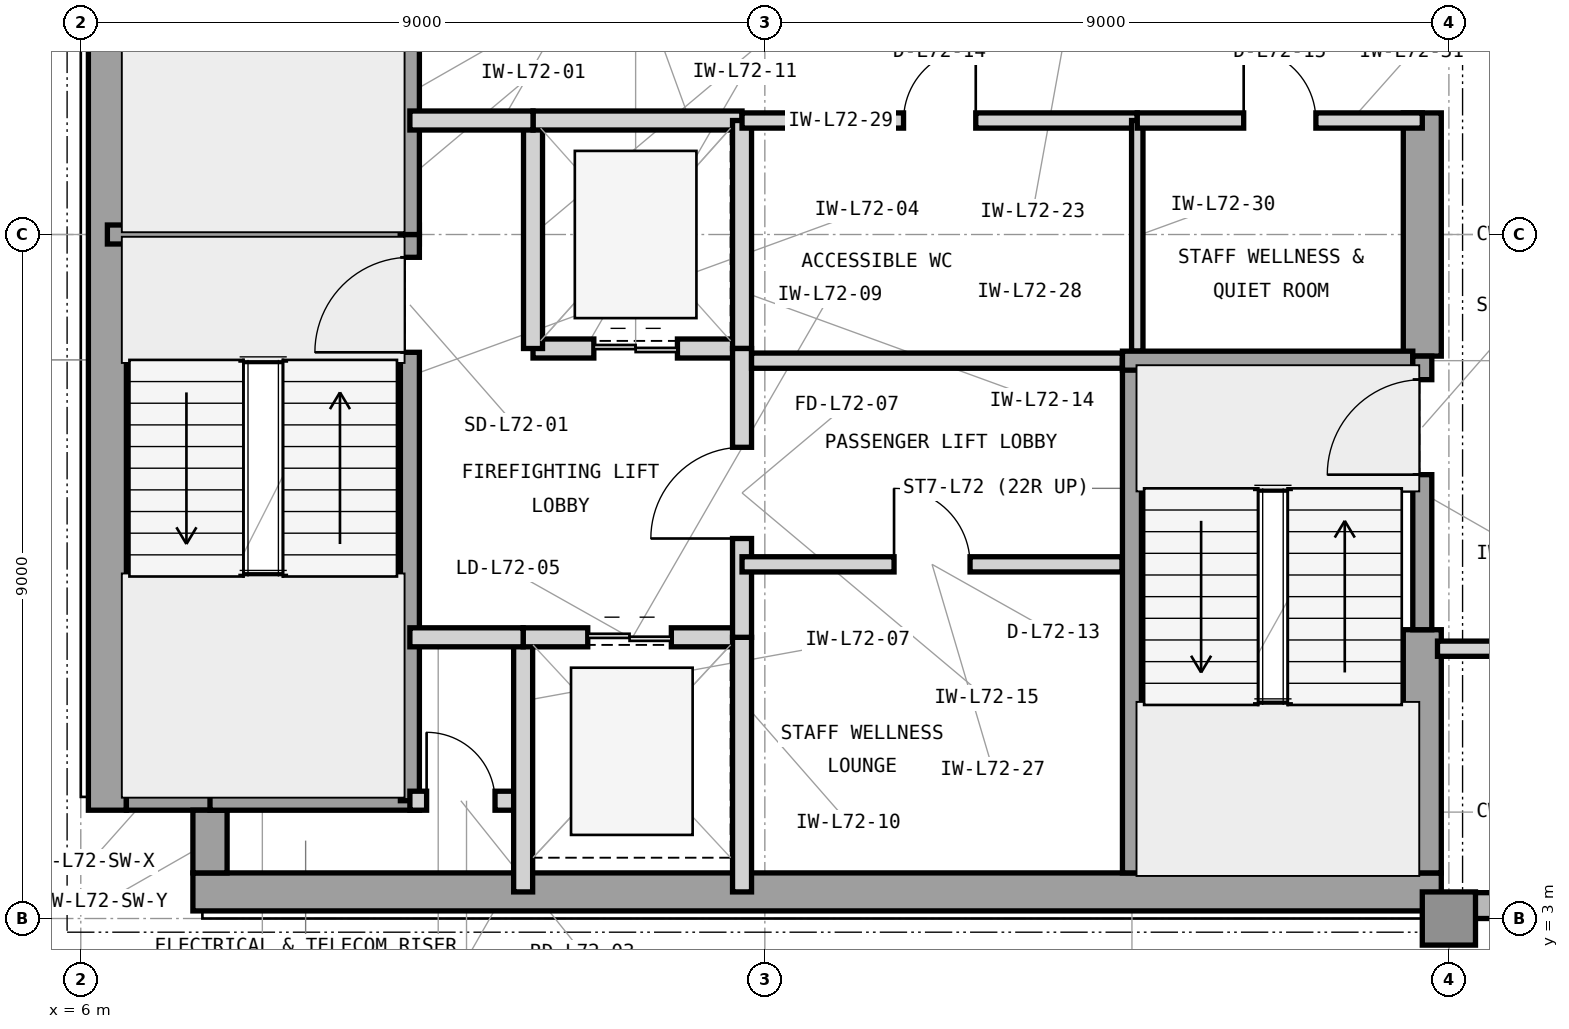
"""IFC4 building model, lengths in metres.
Left out: names, types, materials, properties, quantities, classifications, styles, units other than length and angle.
Written with IfcOpenShell. Run it as: python <this file> out.ifc"""

import sys

from ifc_helpers import new_model, si_unit, direction, frame, frame_2d, origin, origin_2d, place, context, subcontext, project, spatial, rectangle, extrude, element, fill, save


model = new_model("IFC4")
c1 = context("Model", 3, precision=1e-05, world=origin(), true_north=direction((0.0, 1.0)))
c2 = subcontext(c1, "Body", "Model", "MODEL_VIEW")
j1 = project(units=[si_unit("LENGTHUNIT", "METRE"), si_unit("PLANEANGLEUNIT", "RADIAN")], contexts=[c1])
p1 = place(None, origin())
s1 = spatial("IfcSite", under=j1, at=p1, CompositionType="ELEMENT")
p2 = place(p1, origin())
s2 = spatial("IfcBuilding", under=s1, at=p2, CompositionType="ELEMENT")
p3 = place(p2, frame((0.0, 0.0, 293.7)))
s3 = spatial("IfcBuildingStorey", under=s2, at=p3, CompositionType="ELEMENT", Elevation=293.7)
p4 = place(p3, frame((7.475, 3.35, 0.0), z_axis=(0.0, 0.0, 1.0), x_axis=(1.0, 0.0, 0.0)))
e1 = element("IfcWall", 1, at=p4, inside=s3, PredefinedType="SHEAR", context=c2, shape_type="SweptSolid", body=[
    extrude(rectangle(XDim=16.425, YDim=0.5, at=frame_2d((8.212, 0.0))), origin(), (0.0, 0.0, 1.0), 3.9),
])
p5 = place(p3, frame((6.35, 4.425, 0.0), z_axis=(0.0, 0.0, 1.0), x_axis=(0.0, 1.0, 0.0)))
e2 = element("IfcWall", 2, at=p5, inside=s3, PredefinedType="SHEAR", context=c2, shape_type="SweptSolid", body=[
    extrude(rectangle(XDim=15.15, YDim=0.5, at=frame_2d((7.575, 0.0))), origin(), (0.0, 0.0, 1.0), 3.9),
])
p6 = place(p3, frame((23.65, 3.6, 0.0), z_axis=(0.0, 0.0, 1.0), x_axis=(0.0, 1.0, 0.0)))
e3 = element("IfcWall", 3, at=p6, inside=s3, PredefinedType="SHEAR", context=c2, shape_type="SweptSolid", body=[
    extrude(rectangle(XDim=3.2, YDim=0.5, at=frame_2d((1.6, 0.0))), origin(), (0.0, 0.0, 1.0), 3.9),
])
p7 = place(p3, frame((23.65, 10.4, 0.0), z_axis=(0.0, 0.0, 1.0), x_axis=(0.0, 1.0, 0.0)))
e4 = element("IfcWall", 4, at=p7, inside=s3, PredefinedType="SHEAR", context=c2, shape_type="SweptSolid", body=[
    extrude(rectangle(XDim=3.2, YDim=0.5, at=frame_2d((1.6, 0.0))), origin(), (0.0, 0.0, 1.0), 3.9),
])
p8 = place(p3, frame((6.6, 4.65, 0.0), z_axis=(0.0, 0.0, 1.0), x_axis=(1.0, 0.0, 0.0)))
e5 = element("IfcWall", 5, at=p8, inside=s3, PredefinedType="SHEAR", context=c2, shape_type="SweptSolid", body=[
    extrude(rectangle(XDim=1.325, YDim=0.45, at=frame_2d((0.663, 0.0))), origin(), (0.0, 0.0, 1.0), 3.9),
])
p9 = place(p3, frame((7.7, 3.6, 0.0), z_axis=(0.0, 0.0, 1.0), x_axis=(0.0, 1.0, 0.0)))
e6 = element("IfcWall", 6, at=p9, inside=s3, PredefinedType="SHEAR", context=c2, shape_type="SweptSolid", body=[
    extrude(rectangle(XDim=0.825, YDim=0.45, at=frame_2d((0.413, 0.0))), origin(), (0.0, 0.0, 1.0), 3.9),
])
p10 = place(p3, frame((24.0, 3.0, 0.0), z_axis=(0.0, 0.0, 1.0), x_axis=(1.0, 0.0, 0.0)))
e7 = element("IfcColumn", 7, at=p10, inside=s3, PredefinedType="COLUMN", context=c2, shape_type="SweptSolid", body=[
    extrude(rectangle(XDim=0.7, YDim=0.7, at=origin_2d()), origin(), (0.0, 0.0, 1.0), 3.9),
])
p11 = place(p3, frame((23.9, 3.17, 0.0), z_axis=(0.0, 0.0, 1.0), x_axis=(1.0, 0.0, 0.0)))
e8 = element("IfcWall", 8, at=p11, inside=s3, PredefinedType="STANDARD", context=c2, shape_type="SweptSolid", body=[
    extrude(rectangle(XDim=25.5, YDim=0.34, at=frame_2d((12.75, 0.0))), origin(), (0.0, 0.0, 1.0), 3.715),
])
p12 = place(p11, frame((1.6, 0.0, 0.8)))
e9 = element("IfcOpeningElement", 9, at=p12, cuts=e8, PredefinedType="OPENING", context=c2, shape_type="SweptSolid", body=[
    extrude(rectangle(XDim=1.9, YDim=2.35, at=frame_2d((0.95, 1.175))), frame((0.0, 0.18, 0.0), z_axis=(0.0, -1.0, 0.0), x_axis=(1.0, 0.0, 0.0)), (0.0, 0.0, 1.0), 0.36),
])
p13 = place(p11, frame((11.45, 0.0, 0.8)))
e10 = element("IfcOpeningElement", 10, at=p13, cuts=e8, PredefinedType="OPENING", context=c2, shape_type="SweptSolid", body=[
    extrude(rectangle(XDim=2.6, YDim=2.35, at=frame_2d((1.3, 1.175))), frame((0.0, 0.18, 0.0), z_axis=(0.0, -1.0, 0.0), x_axis=(1.0, 0.0, 0.0)), (0.0, 0.0, 1.0), 0.36),
])
p14 = place(p11, frame((15.925, 0.0, 0.8)))
e11 = element("IfcOpeningElement", 11, at=p14, cuts=e8, PredefinedType="OPENING", context=c2, shape_type="SweptSolid", body=[
    extrude(rectangle(XDim=1.2, YDim=2.35, at=frame_2d((0.6, 1.175))), frame((0.0, 0.18, 0.0), z_axis=(0.0, -1.0, 0.0), x_axis=(1.0, 0.0, 0.0)), (0.0, 0.0, 1.0), 0.36),
])
p15 = place(p3, frame((6.35, 12.0, 0.0), z_axis=(0.0, 0.0, 1.0), x_axis=(1.0, 0.0, 0.0)))
e12 = element("IfcWall", 12, at=p15, inside=s3, PredefinedType="SHEAR", context=c2, shape_type="SweptSolid", body=[
    extrude(rectangle(XDim=4.105, YDim=0.25, at=frame_2d((2.052, 0.0))), origin(), (0.0, 0.0, 1.0), 3.9),
])
p16 = place(p3, frame((7.7, 4.55, 0.0), z_axis=(0.0, 0.0, 1.0), x_axis=(1.0, 0.0, 0.0)))
e13 = element("IfcWall", 13, at=p16, inside=s3, PredefinedType="SHEAR", context=c2, shape_type="SweptSolid", body=[
    extrude(rectangle(XDim=2.755, YDim=0.25, at=frame_2d((1.377, 0.0))), origin(), (0.0, 0.0, 1.0), 3.9),
])
p17 = place(p3, frame((10.33, 4.55, 0.0), z_axis=(0.0, 0.0, 1.0), x_axis=(0.0, 1.0, 0.0)))
e14 = element("IfcWall", 14, at=p17, inside=s3, PredefinedType="SHEAR", context=c2, shape_type="SweptSolid", body=[
    extrude(rectangle(XDim=7.45, YDim=0.25, at=frame_2d((3.725, 0.0))), origin(), (0.0, 0.0, 1.0), 3.9),
])
p18 = place(p17, frame((5.9, 0.0, 0.0)))
e15 = element("IfcOpeningElement", 15, at=p18, cuts=e14, PredefinedType="OPENING", context=c2, shape_type="SweptSolid", body=[
    extrude(rectangle(XDim=1.25, YDim=2.2, at=frame_2d((0.625, 1.1))), frame((0.0, 0.135, 0.0), z_axis=(0.0, -1.0, 0.0), x_axis=(1.0, 0.0, 0.0)), (0.0, 0.0, 1.0), 0.27),
])
p19 = place(p3, frame((10.33, 12.0, 0.0), z_axis=(0.0, 0.0, 1.0), x_axis=(0.0, 1.0, 0.0)))
e16 = element("IfcWall", 16, at=p19, inside=s3, PredefinedType="SHEAR", context=c2, shape_type="SweptSolid", body=[
    extrude(rectangle(XDim=7.45, YDim=0.25, at=frame_2d((3.725, 0.0))), origin(), (0.0, 0.0, 1.0), 3.9),
])
p20 = place(p19, frame((5.85, 0.0, 0.0)))
e17 = element("IfcOpeningElement", 17, at=p20, cuts=e16, PredefinedType="OPENING", context=c2, shape_type="SweptSolid", body=[
    extrude(rectangle(XDim=1.25, YDim=2.2, at=frame_2d((0.625, 1.1))), frame((0.0, 0.135, 0.0), z_axis=(0.0, -1.0, 0.0), x_axis=(1.0, 0.0, 0.0)), (0.0, 0.0, 1.0), 0.27),
])
p21 = place(p3, frame((10.33, 4.55, 0.0), z_axis=(0.0, 0.0, 1.0), x_axis=(1.0, 0.0, 0.0)))
e18 = element("IfcWall", 18, at=p21, inside=s3, PredefinedType="PARTITIONING", context=c2, shape_type="SweptSolid", body=[
    extrude(rectangle(XDim=1.49, YDim=0.25, at=frame_2d((0.745, 0.0))), origin(), (0.0, 0.0, 1.0), 3.705),
])
p22 = place(p21, frame((0.22, 0.0, 0.0)))
e19 = element("IfcOpeningElement", 19, at=p22, cuts=e18, PredefinedType="OPENING", context=c2, shape_type="SweptSolid", body=[
    extrude(rectangle(XDim=0.9, YDim=2.1, at=frame_2d((0.45, 1.05))), frame((0.0, 0.135, 0.0), z_axis=(0.0, -1.0, 0.0), x_axis=(1.0, 0.0, 0.0)), (0.0, 0.0, 1.0), 0.27),
])
p23 = place(p3, frame((11.82, 3.35, 0.0), z_axis=(0.0, 0.0, 1.0), x_axis=(0.0, 1.0, 0.0)))
e20 = element("IfcWall", 20, at=p23, inside=s3, PredefinedType="PARTITIONING", context=c2, shape_type="SweptSolid", body=[
    extrude(rectangle(XDim=3.35, YDim=0.25, at=frame_2d((1.675, 0.0))), origin(), (0.0, 0.0, 1.0), 3.705),
])
p24 = place(p3, frame((11.82, 6.7, 0.0), z_axis=(0.0, 0.0, 1.0), x_axis=(1.0, 0.0, 0.0)))
e21 = element("IfcWall", 21, at=p24, inside=s3, PredefinedType="PARTITIONING", context=c2, shape_type="SweptSolid", body=[
    extrude(rectangle(XDim=2.88, YDim=0.25, at=frame_2d((1.44, 0.0))), origin(), (0.0, 0.0, 1.0), 3.354),
])
p25 = place(p24, frame((0.85, 0.0, 0.0)))
e22 = element("IfcOpeningElement", 22, at=p25, cuts=e21, PredefinedType="OPENING", context=c2, shape_type="SweptSolid", body=[
    extrude(rectangle(XDim=1.1, YDim=2.25, at=frame_2d((0.55, 1.125))), frame((0.0, 0.135, 0.0), z_axis=(0.0, -1.0, 0.0), x_axis=(1.0, 0.0, 0.0)), (0.0, 0.0, 1.0), 0.27),
])
p26 = place(p3, frame((14.7, 3.35, 0.0), z_axis=(0.0, 0.0, 1.0), x_axis=(0.0, 1.0, 0.0)))
e23 = element("IfcWall", 23, at=p26, inside=s3, PredefinedType="PARTITIONING", context=c2, shape_type="SweptSolid", body=[
    extrude(rectangle(XDim=3.35, YDim=0.25, at=frame_2d((1.675, 0.0))), origin(), (0.0, 0.0, 1.0), 3.705),
])
p27 = place(p3, frame((11.95, 10.5, 0.0), z_axis=(0.0, 0.0, 1.0), x_axis=(1.0, 0.0, 0.0)))
e24 = element("IfcWall", 24, at=p27, inside=s3, PredefinedType="PARTITIONING", context=c2, shape_type="SweptSolid", body=[
    extrude(rectangle(XDim=2.75, YDim=0.25, at=frame_2d((1.375, 0.0))), origin(), (0.0, 0.0, 1.0), 3.354),
])
p28 = place(p27, frame((0.8, 0.0, 0.0)))
e25 = element("IfcOpeningElement", 25, at=p28, cuts=e24, PredefinedType="OPENING", context=c2, shape_type="SweptSolid", body=[
    extrude(rectangle(XDim=1.1, YDim=2.25, at=frame_2d((0.55, 1.125))), frame((0.0, 0.135, 0.0), z_axis=(0.0, -1.0, 0.0), x_axis=(1.0, 0.0, 0.0)), (0.0, 0.0, 1.0), 0.27),
])
p29 = place(p3, frame((11.95, 10.5, 0.0), z_axis=(0.0, 0.0, 1.0), x_axis=(0.0, 1.0, 0.0)))
e26 = element("IfcWall", 26, at=p29, inside=s3, PredefinedType="PARTITIONING", context=c2, shape_type="SweptSolid", body=[
    extrude(rectangle(XDim=3.0, YDim=0.25, at=frame_2d((1.5, 0.0))), origin(), (0.0, 0.0, 1.0), 3.705),
])
p30 = place(p3, frame((11.95, 13.5, 0.0), z_axis=(0.0, 0.0, 1.0), x_axis=(1.0, 0.0, 0.0)))
e27 = element("IfcWall", 27, at=p30, inside=s3, PredefinedType="PARTITIONING", context=c2, shape_type="SweptSolid", body=[
    extrude(rectangle(XDim=2.75, YDim=0.25, at=frame_2d((1.375, 0.0))), origin(), (0.0, 0.0, 1.0), 3.354),
])
p31 = place(p3, frame((14.7, 10.5, 0.0), z_axis=(0.0, 0.0, 1.0), x_axis=(0.0, 1.0, 0.0)))
e28 = element("IfcWall", 28, at=p31, inside=s3, PredefinedType="PARTITIONING", context=c2, shape_type="SweptSolid", body=[
    extrude(rectangle(XDim=3.0, YDim=0.25, at=frame_2d((1.5, 0.0))), origin(), (0.0, 0.0, 1.0), 3.705),
])
p32 = place(p3, frame((14.7, 6.7, 0.0), z_axis=(0.0, 0.0, 1.0), x_axis=(0.0, 1.0, 0.0)))
e29 = element("IfcWall", 29, at=p32, inside=s3, PredefinedType="PARTITIONING", context=c2, shape_type="SweptSolid", body=[
    extrude(rectangle(XDim=3.8, YDim=0.25, at=frame_2d((1.9, 0.0))), origin(), (0.0, 0.0, 1.0), 3.705),
])
p33 = place(p32, frame((1.3, 0.0, 0.0)))
e30 = element("IfcOpeningElement", 30, at=p33, cuts=e29, PredefinedType="OPENING", context=c2, shape_type="SweptSolid", body=[
    extrude(rectangle(XDim=1.2, YDim=2.2, at=frame_2d((0.6, 1.1))), frame((0.0, 0.135, 0.0), z_axis=(0.0, -1.0, 0.0), x_axis=(1.0, 0.0, 0.0)), (0.0, 0.0, 1.0), 0.27),
])
p34 = place(p3, frame((10.33, 13.5, 0.0), z_axis=(0.0, 0.0, 1.0), x_axis=(1.0, 0.0, 0.0)))
e31 = element("IfcWall", 31, at=p34, inside=s3, PredefinedType="PARTITIONING", context=c2, shape_type="SweptSolid", body=[
    extrude(rectangle(XDim=1.62, YDim=0.25, at=frame_2d((0.81, 0.0))), origin(), (0.0, 0.0, 1.0), 3.354),
])
p35 = place(p3, frame((10.33, 6.7, 0.0), z_axis=(0.0, 0.0, 1.0), x_axis=(1.0, 0.0, 0.0)))
e32 = element("IfcWall", 32, at=p35, inside=s3, PredefinedType="PARTITIONING", context=c2, shape_type="SweptSolid", body=[
    extrude(rectangle(XDim=1.49, YDim=0.25, at=frame_2d((0.745, 0.0))), origin(), (0.0, 0.0, 1.0), 3.354),
])
p36 = place(p3, frame((14.7, 7.66, 0.0), z_axis=(0.0, 0.0, 1.0), x_axis=(1.0, 0.0, 0.0)))
e33 = element("IfcWall", 33, at=p36, inside=s3, PredefinedType="PARTITIONING", context=c2, shape_type="SweptSolid", body=[
    extrude(rectangle(XDim=5.0, YDim=0.2, at=frame_2d((2.5, 0.0))), origin(), (0.0, 0.0, 1.0), 3.705),
])
p37 = place(p36, frame((2.0, 0.0, 0.0)))
e34 = element("IfcOpeningElement", 34, at=p37, cuts=e33, PredefinedType="OPENING", context=c2, shape_type="SweptSolid", body=[
    extrude(rectangle(XDim=1.0, YDim=2.15, at=frame_2d((0.5, 1.075))), frame((0.0, 0.11, 0.0), z_axis=(0.0, -1.0, 0.0), x_axis=(1.0, 0.0, 0.0)), (0.0, 0.0, 1.0), 0.22),
])
p38 = place(p3, frame((14.825, 10.34, 0.0), z_axis=(0.0, 0.0, 1.0), x_axis=(1.0, 0.0, 0.0)))
e35 = element("IfcWall", 35, at=p38, inside=s3, PredefinedType="PARTITIONING", context=c2, shape_type="SweptSolid", body=[
    extrude(rectangle(XDim=4.88, YDim=0.2, at=frame_2d((2.44, 0.0))), origin(), (0.0, 0.0, 1.0), 3.705),
])
p39 = place(p3, frame((14.7, 13.5, 0.0), z_axis=(0.0, 0.0, 1.0), x_axis=(1.0, 0.0, 0.0)))
e36 = element("IfcWall", 36, at=p39, inside=s3, PredefinedType="PARTITIONING", context=c2, shape_type="SweptSolid", body=[
    extrude(rectangle(XDim=5.2, YDim=0.2, at=frame_2d((2.6, 0.0))), origin(), (0.0, 0.0, 1.0), 3.354),
])
p40 = place(p39, frame((2.125, 0.0, 0.0)))
e37 = element("IfcOpeningElement", 37, at=p40, cuts=e36, PredefinedType="OPENING", context=c2, shape_type="SweptSolid", body=[
    extrude(rectangle(XDim=0.95, YDim=2.1, at=frame_2d((0.475, 1.05))), frame((0.0, 0.11, 0.0), z_axis=(0.0, -1.0, 0.0), x_axis=(1.0, 0.0, 0.0)), (0.0, 0.0, 1.0), 0.22),
])
p41 = place(p3, frame((19.9, 10.465, 0.0), z_axis=(0.0, 0.0, 1.0), x_axis=(0.0, 1.0, 0.0)))
e38 = element("IfcWall", 38, at=p41, inside=s3, PredefinedType="PARTITIONING", context=c2, shape_type="SweptSolid", body=[
    extrude(rectangle(XDim=3.035, YDim=0.15, at=frame_2d((1.518, 0.0))), origin(), (0.0, 0.0, 1.0), 3.705),
])
p42 = place(p3, frame((19.9, 13.5, 0.0), z_axis=(0.0, 0.0, 1.0), x_axis=(1.0, 0.0, 0.0)))
e39 = element("IfcWall", 39, at=p42, inside=s3, PredefinedType="PARTITIONING", context=c2, shape_type="SweptSolid", body=[
    extrude(rectangle(XDim=3.75, YDim=0.2, at=frame_2d((1.875, 0.0))), origin(), (0.0, 0.0, 1.0), 3.354),
])
p43 = place(p42, frame((1.4, 0.0, 0.0)))
e40 = element("IfcOpeningElement", 40, at=p43, cuts=e39, PredefinedType="OPENING", context=c2, shape_type="SweptSolid", body=[
    extrude(rectangle(XDim=0.95, YDim=2.1, at=frame_2d((0.475, 1.05))), frame((0.0, 0.11, 0.0), z_axis=(0.0, -1.0, 0.0), x_axis=(1.0, 0.0, 0.0)), (0.0, 0.0, 1.0), 0.22),
])
p44 = place(p3, frame((23.85, 6.55, 0.0), z_axis=(0.0, 0.0, 1.0), x_axis=(1.0, 0.0, 0.0)))
e41 = element("IfcWall", 41, at=p44, inside=s3, PredefinedType="PARTITIONING", context=c2, shape_type="SweptSolid", body=[
    extrude(rectangle(XDim=7.35, YDim=0.2, at=frame_2d((3.675, 0.0))), origin(), (0.0, 0.0, 1.0), 3.705),
])
p45 = place(p44, frame((2.8, 0.0, 0.0)))
e42 = element("IfcOpeningElement", 42, at=p45, cuts=e41, PredefinedType="OPENING", context=c2, shape_type="SweptSolid", body=[
    extrude(rectangle(XDim=1.0, YDim=2.15, at=frame_2d((0.5, 1.075))), frame((0.0, 0.11, 0.0), z_axis=(0.0, -1.0, 0.0), x_axis=(1.0, 0.0, 0.0)), (0.0, 0.0, 1.0), 0.22),
])
p46 = place(p3, frame((19.83, 3.6, 0.0), z_axis=(0.0, 0.0, 1.0), x_axis=(0.0, 1.0, 0.0)))
e43 = element("IfcWall", 43, at=p46, inside=s3, PredefinedType="SHEAR", context=c2, shape_type="SweptSolid", body=[
    extrude(rectangle(XDim=6.74, YDim=0.25, at=frame_2d((3.37, 0.0))), origin(), (0.0, 0.0, 1.0), 3.9),
])
p47 = place(p3, frame((19.705, 10.34, 0.0), z_axis=(0.0, 0.0, 1.0), x_axis=(1.0, 0.0, 0.0)))
e44 = element("IfcWall", 44, at=p47, inside=s3, PredefinedType="SHEAR", context=c2, shape_type="SweptSolid", body=[
    extrude(rectangle(XDim=3.82, YDim=0.25, at=frame_2d((1.91, 0.0))), origin(), (0.0, 0.0, 1.0), 3.9),
])
p48 = place(p3, frame((23.65, 6.8, 0.0), z_axis=(0.0, 0.0, 1.0), x_axis=(0.0, 1.0, 0.0)))
e45 = element("IfcWall", 45, at=p48, inside=s3, PredefinedType="SHEAR", context=c2, shape_type="SweptSolid", body=[
    extrude(rectangle(XDim=3.6, YDim=0.25, at=frame_2d((1.8, 0.0))), origin(), (0.0, 0.0, 1.0), 3.9),
])
p49 = place(p48, frame((2.04, 0.0, 0.0)))
e46 = element("IfcOpeningElement", 46, at=p49, cuts=e45, PredefinedType="OPENING", context=c2, shape_type="SweptSolid", body=[
    extrude(rectangle(XDim=1.25, YDim=2.2, at=frame_2d((0.625, 1.1))), frame((0.0, 0.135, 0.0), z_axis=(0.0, -1.0, 0.0), x_axis=(1.0, 0.0, 0.0)), (0.0, 0.0, 1.0), 0.27),
])
p50 = place(p18, origin())
e47 = element("IfcDoor", 47, at=p50, inside=s3, OperationType="SINGLE_SWING_LEFT", PredefinedType="DOOR", context=c2, shape_type="SweptSolid", body=[
    extrude(rectangle(XDim=1.25, YDim=2.2, at=frame_2d((0.625, 1.1))), frame((0.0, 0.025, 0.0), z_axis=(0.0, -1.0, 0.0), x_axis=(1.0, 0.0, 0.0)), (0.0, 0.0, 1.0), 0.05),
])
fill(e15, e47)
p51 = place(p22, origin())
e48 = element("IfcDoor", 48, at=p51, inside=s3, OperationType="SINGLE_SWING_LEFT", PredefinedType="TRAPDOOR", context=c2, shape_type="SweptSolid", body=[
    extrude(rectangle(XDim=0.9, YDim=2.1, at=frame_2d((0.45, 1.05))), frame((0.0, 0.025, 0.0), z_axis=(0.0, -1.0, 0.0), x_axis=(1.0, 0.0, 0.0)), (0.0, 0.0, 1.0), 0.05),
])
fill(e19, e48)
p52 = place(p25, origin())
e49 = element("IfcDoor", 49, at=p52, inside=s3, OperationType="DOUBLE_DOOR_SLIDING", PredefinedType="DOOR", context=c2, shape_type="SweptSolid", body=[
    extrude(rectangle(XDim=1.1, YDim=2.25, at=frame_2d((0.55, 1.125))), frame((0.0, 0.025, 0.0), z_axis=(0.0, -1.0, 0.0), x_axis=(1.0, 0.0, 0.0)), (0.0, 0.0, 1.0), 0.05),
])
fill(e22, e49)
p53 = place(p28, origin())
e50 = element("IfcDoor", 50, at=p53, inside=s3, OperationType="DOUBLE_DOOR_SLIDING", PredefinedType="DOOR", context=c2, shape_type="SweptSolid", body=[
    extrude(rectangle(XDim=1.1, YDim=2.25, at=frame_2d((0.55, 1.125))), frame((0.0, 0.025, 0.0), z_axis=(0.0, -1.0, 0.0), x_axis=(1.0, 0.0, 0.0)), (0.0, 0.0, 1.0), 0.05),
])
fill(e25, e50)
p54 = place(p33, origin())
e51 = element("IfcDoor", 51, at=p54, inside=s3, OperationType="SINGLE_SWING_LEFT", PredefinedType="DOOR", context=c2, shape_type="SweptSolid", body=[
    extrude(rectangle(XDim=1.2, YDim=2.2, at=frame_2d((0.6, 1.1))), frame((0.0, 0.025, 0.0), z_axis=(0.0, -1.0, 0.0), x_axis=(1.0, 0.0, 0.0)), (0.0, 0.0, 1.0), 0.05),
])
fill(e30, e51)
p55 = place(p37, origin())
e52 = element("IfcDoor", 52, at=p55, inside=s3, OperationType="SINGLE_SWING_LEFT", PredefinedType="DOOR", context=c2, shape_type="SweptSolid", body=[
    extrude(rectangle(XDim=1.0, YDim=2.15, at=frame_2d((0.5, 1.075))), frame((0.0, 0.025, 0.0), z_axis=(0.0, -1.0, 0.0), x_axis=(1.0, 0.0, 0.0)), (0.0, 0.0, 1.0), 0.05),
])
fill(e34, e52)
p56 = place(p40, origin())
e53 = element("IfcDoor", 53, at=p56, inside=s3, OperationType="SINGLE_SWING_RIGHT", PredefinedType="DOOR", context=c2, shape_type="SweptSolid", body=[
    extrude(rectangle(XDim=0.95, YDim=2.1, at=frame_2d((0.475, 1.05))), frame((0.0, 0.025, 0.0), z_axis=(0.0, -1.0, 0.0), x_axis=(1.0, 0.0, 0.0)), (0.0, 0.0, 1.0), 0.05),
])
fill(e37, e53)
p57 = place(p43, origin())
e54 = element("IfcDoor", 54, at=p57, inside=s3, OperationType="SINGLE_SWING_LEFT", PredefinedType="DOOR", context=c2, shape_type="SweptSolid", body=[
    extrude(rectangle(XDim=0.95, YDim=2.1, at=frame_2d((0.475, 1.05))), frame((0.0, 0.025, 0.0), z_axis=(0.0, -1.0, 0.0), x_axis=(1.0, 0.0, 0.0)), (0.0, 0.0, 1.0), 0.05),
])
fill(e40, e54)
p58 = place(p49, origin())
e55 = element("IfcDoor", 55, at=p58, inside=s3, OperationType="SINGLE_SWING_LEFT", PredefinedType="DOOR", context=c2, shape_type="SweptSolid", body=[
    extrude(rectangle(XDim=1.25, YDim=2.2, at=frame_2d((0.625, 1.1))), frame((0.0, 0.025, 0.0), z_axis=(0.0, -1.0, 0.0), x_axis=(1.0, 0.0, 0.0)), (0.0, 0.0, 1.0), 0.05),
])
fill(e46, e55)
save(model, sys.argv[1])
